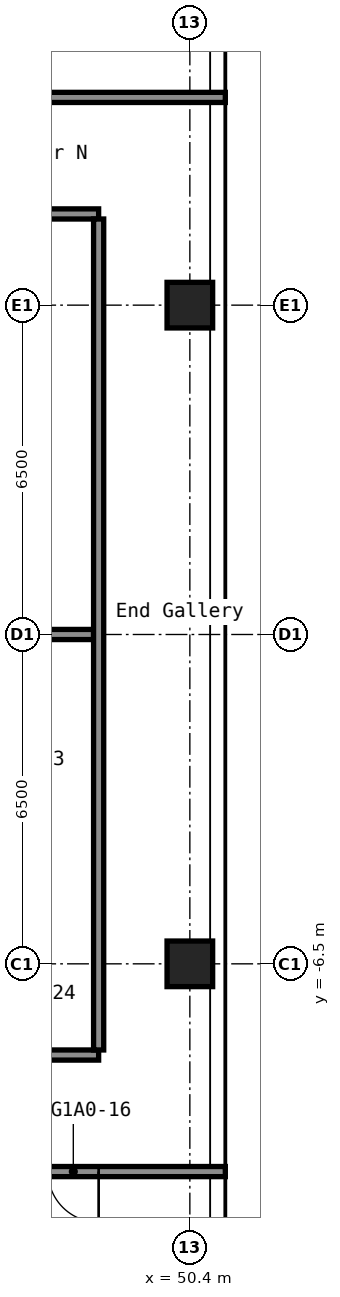
"""IFC4 building model, lengths in metres.
Left out: names, types, materials, properties, quantities, classifications, styles, units other than length and angle.
Written with IfcOpenShell. Run it as: python <this file> out.ifc"""

import sys

from ifc_helpers import new_model, si_unit, direction, frame, frame_2d, origin, origin_2d, place, context, subcontext, project, spatial, rectangle, hollow_rectangle, extrude, element, fill, save


model = new_model("IFC4")
c1 = context("Model", 3, precision=1e-05, world=origin(), true_north=direction((0.0, 1.0)))
c2 = subcontext(c1, "Body", "Model", "MODEL_VIEW")
j1 = project(units=[si_unit("LENGTHUNIT", "METRE"), si_unit("PLANEANGLEUNIT", "RADIAN")], contexts=[c1])
p1 = place(None, origin())
s1 = spatial("IfcSite", under=j1, at=p1, CompositionType="ELEMENT")
p2 = place(p1, origin())
s2 = spatial("IfcBuilding", under=s1, at=p2, CompositionType="ELEMENT")
p3 = place(p2, frame((0.0, 0.0, 19.8)))
s3 = spatial("IfcBuildingStorey", under=s2, at=p3, CompositionType="ELEMENT", Elevation=19.8)
for number, where, z_axis, x_axis in (
    (1, (50.4, -6.5, 0.0), (0.0, 0.0, 1.0), (1.0, 0.0, 0.0)),
    (2, (50.4, 6.5, 0.0), (0.0, 0.0, 1.0), (1.0, 0.0, 0.0)),
):
    element("IfcColumn", number, at=place(p3, frame(where, z_axis=z_axis, x_axis=x_axis)), inside=s3, PredefinedType="COLUMN", context=c2, shape_type="SweptSolid", body=[
        extrude(hollow_rectangle(XDim=0.9, YDim=0.9, WallThickness=0.036, at=origin_2d()), origin(), (0.0, 0.0, 1.0), 2.8),
    ])
p4 = place(p3, frame((16.8, -10.6, 0.0), z_axis=(0.0, 0.0, 1.0), x_axis=(1.0, 0.0, 0.0)))
e3 = element("IfcWall", 3, at=p4, inside=s3, PredefinedType="PARTITIONING", context=c2, shape_type="SweptSolid", body=[
    extrude(rectangle(XDim=34.3, YDim=0.2, at=frame_2d((17.15, 0.0))), origin(), (0.0, 0.0, 1.0), 2.8),
])
p5 = place(p4, frame((5.4, 0.0, 0.0)))
e4 = element("IfcOpeningElement", 4, at=p5, cuts=e3, PredefinedType="OPENING", context=c2, shape_type="SweptSolid", body=[
    extrude(rectangle(XDim=1.0, YDim=2.1, at=frame_2d((0.5, 1.05))), frame((0.0, 0.11, 0.0), z_axis=(0.0, -1.0, 0.0), x_axis=(1.0, 0.0, 0.0)), (0.0, 0.0, 1.0), 0.22),
])
p6 = place(p4, frame((10.4, 0.0, 0.0)))
e5 = element("IfcOpeningElement", 5, at=p6, cuts=e3, PredefinedType="OPENING", context=c2, shape_type="SweptSolid", body=[
    extrude(rectangle(XDim=1.0, YDim=2.1, at=frame_2d((0.5, 1.05))), frame((0.0, 0.11, 0.0), z_axis=(0.0, -1.0, 0.0), x_axis=(1.0, 0.0, 0.0)), (0.0, 0.0, 1.0), 0.22),
])
p7 = place(p4, frame((22.2, 0.0, 0.0)))
e6 = element("IfcOpeningElement", 6, at=p7, cuts=e3, PredefinedType="OPENING", context=c2, shape_type="SweptSolid", body=[
    extrude(rectangle(XDim=1.0, YDim=2.1, at=frame_2d((0.5, 1.05))), frame((0.0, 0.11, 0.0), z_axis=(0.0, -1.0, 0.0), x_axis=(1.0, 0.0, 0.0)), (0.0, 0.0, 1.0), 0.22),
])
p8 = place(p4, frame((30.8, 0.0, 0.0)))
e7 = element("IfcOpeningElement", 7, at=p8, cuts=e3, PredefinedType="OPENING", context=c2, shape_type="SweptSolid", body=[
    extrude(rectangle(XDim=1.0, YDim=2.1, at=frame_2d((0.5, 1.05))), frame((0.0, 0.11, 0.0), z_axis=(0.0, -1.0, 0.0), x_axis=(1.0, 0.0, 0.0)), (0.0, 0.0, 1.0), 0.22),
])
p9 = place(p3, frame((33.6, -8.3, 0.0), z_axis=(0.0, 0.0, 1.0), x_axis=(1.0, 0.0, 0.0)))
e8 = element("IfcWall", 8, at=p9, inside=s3, PredefinedType="PARTITIONING", context=c2, shape_type="SweptSolid", body=[
    extrude(rectangle(XDim=15.0, YDim=0.2, at=frame_2d((7.5, 0.0))), origin(), (0.0, 0.0, 1.0), 2.8),
])
p10 = place(p9, frame((5.8, 0.0, 0.0)))
e9 = element("IfcOpeningElement", 9, at=p10, cuts=e8, PredefinedType="OPENING", context=c2, shape_type="SweptSolid", body=[
    extrude(rectangle(XDim=1.0, YDim=2.1, at=frame_2d((0.5, 1.05))), frame((0.0, 0.11, 0.0), z_axis=(0.0, -1.0, 0.0), x_axis=(1.0, 0.0, 0.0)), (0.0, 0.0, 1.0), 0.22),
])
p11 = place(p9, frame((12.9, 0.0, 0.0)))
e10 = element("IfcOpeningElement", 10, at=p11, cuts=e8, PredefinedType="OPENING", context=c2, shape_type="SweptSolid", body=[
    extrude(rectangle(XDim=1.0, YDim=2.1, at=frame_2d((0.5, 1.05))), frame((0.0, 0.11, 0.0), z_axis=(0.0, -1.0, 0.0), x_axis=(1.0, 0.0, 0.0)), (0.0, 0.0, 1.0), 0.22),
])
p12 = place(p3, frame((33.6, 0.0, 0.0), z_axis=(0.0, 0.0, 1.0), x_axis=(1.0, 0.0, 0.0)))
e11 = element("IfcWall", 11, at=p12, inside=s3, PredefinedType="PARTITIONING", context=c2, shape_type="SweptSolid", body=[
    extrude(rectangle(XDim=14.9, YDim=0.2, at=frame_2d((7.45, 0.0))), origin(), (0.0, 0.0, 1.0), 2.8),
])
p13 = place(p3, frame((33.6, 8.3, 0.0), z_axis=(0.0, 0.0, 1.0), x_axis=(1.0, 0.0, 0.0)))
e12 = element("IfcWall", 12, at=p13, inside=s3, PredefinedType="PARTITIONING", context=c2, shape_type="SweptSolid", body=[
    extrude(rectangle(XDim=15.0, YDim=0.2, at=frame_2d((7.5, 0.0))), origin(), (0.0, 0.0, 1.0), 2.8),
])
p14 = place(p13, frame((2.4, 0.0, 0.0)))
e13 = element("IfcOpeningElement", 13, at=p14, cuts=e12, PredefinedType="OPENING", context=c2, shape_type="SweptSolid", body=[
    extrude(rectangle(XDim=0.9, YDim=2.1, at=frame_2d((0.45, 1.05))), frame((0.0, 0.11, 0.0), z_axis=(0.0, -1.0, 0.0), x_axis=(1.0, 0.0, 0.0)), (0.0, 0.0, 1.0), 0.22),
])
p15 = place(p13, frame((9.9, 0.0, 0.0)))
e14 = element("IfcOpeningElement", 14, at=p15, cuts=e12, PredefinedType="OPENING", context=c2, shape_type="SweptSolid", body=[
    extrude(rectangle(XDim=0.9, YDim=2.1, at=frame_2d((0.45, 1.05))), frame((0.0, 0.11, 0.0), z_axis=(0.0, -1.0, 0.0), x_axis=(1.0, 0.0, 0.0)), (0.0, 0.0, 1.0), 0.22),
])
p16 = place(p3, frame((16.8, 10.6, 0.0), z_axis=(0.0, 0.0, 1.0), x_axis=(1.0, 0.0, 0.0)))
e15 = element("IfcWall", 15, at=p16, inside=s3, PredefinedType="PARTITIONING", context=c2, shape_type="SweptSolid", body=[
    extrude(rectangle(XDim=34.3, YDim=0.2, at=frame_2d((17.15, 0.0))), origin(), (0.0, 0.0, 1.0), 2.8),
])
p17 = place(p16, frame((5.4, 0.0, 0.0)))
e16 = element("IfcOpeningElement", 16, at=p17, cuts=e15, PredefinedType="OPENING", context=c2, shape_type="SweptSolid", body=[
    extrude(rectangle(XDim=1.0, YDim=2.1, at=frame_2d((0.5, 1.05))), frame((0.0, 0.11, 0.0), z_axis=(0.0, -1.0, 0.0), x_axis=(1.0, 0.0, 0.0)), (0.0, 0.0, 1.0), 0.22),
])
p18 = place(p16, frame((10.4, 0.0, 0.0)))
e17 = element("IfcOpeningElement", 17, at=p18, cuts=e15, PredefinedType="OPENING", context=c2, shape_type="SweptSolid", body=[
    extrude(rectangle(XDim=1.0, YDim=2.1, at=frame_2d((0.5, 1.05))), frame((0.0, 0.11, 0.0), z_axis=(0.0, -1.0, 0.0), x_axis=(1.0, 0.0, 0.0)), (0.0, 0.0, 1.0), 0.22),
])
p19 = place(p16, frame((22.2, 0.0, 0.0)))
e18 = element("IfcOpeningElement", 18, at=p19, cuts=e15, PredefinedType="OPENING", context=c2, shape_type="SweptSolid", body=[
    extrude(rectangle(XDim=1.0, YDim=2.1, at=frame_2d((0.5, 1.05))), frame((0.0, 0.11, 0.0), z_axis=(0.0, -1.0, 0.0), x_axis=(1.0, 0.0, 0.0)), (0.0, 0.0, 1.0), 0.22),
])
p20 = place(p16, frame((27.4, 0.0, 0.0)))
e19 = element("IfcOpeningElement", 19, at=p20, cuts=e15, PredefinedType="OPENING", context=c2, shape_type="SweptSolid", body=[
    extrude(rectangle(XDim=1.0, YDim=2.1, at=frame_2d((0.5, 1.05))), frame((0.0, 0.11, 0.0), z_axis=(0.0, -1.0, 0.0), x_axis=(1.0, 0.0, 0.0)), (0.0, 0.0, 1.0), 0.22),
])
p21 = place(p3, frame((48.6, -8.2, 0.0), z_axis=(0.0, 0.0, 1.0), x_axis=(0.0, 1.0, 0.0)))
e20 = element("IfcWall", 20, at=p21, inside=s3, PredefinedType="PARTITIONING", context=c2, shape_type="SweptSolid", body=[
    extrude(rectangle(XDim=16.4, YDim=0.2, at=frame_2d((8.2, 0.0))), origin(), (0.0, 0.0, 1.0), 2.8),
])
p22 = place(p8, origin())
e21 = element("IfcDoor", 21, at=p22, inside=s3, OperationType="SINGLE_SWING_RIGHT", PredefinedType="DOOR", context=c2, shape_type="SweptSolid", body=[
    extrude(rectangle(XDim=1.0, YDim=2.1, at=frame_2d((0.5, 1.05))), frame((0.0, 0.025, 0.0), z_axis=(0.0, -1.0, 0.0), x_axis=(1.0, 0.0, 0.0)), (0.0, 0.0, 1.0), 0.05),
])
fill(e7, e21)
save(model, sys.argv[1])
